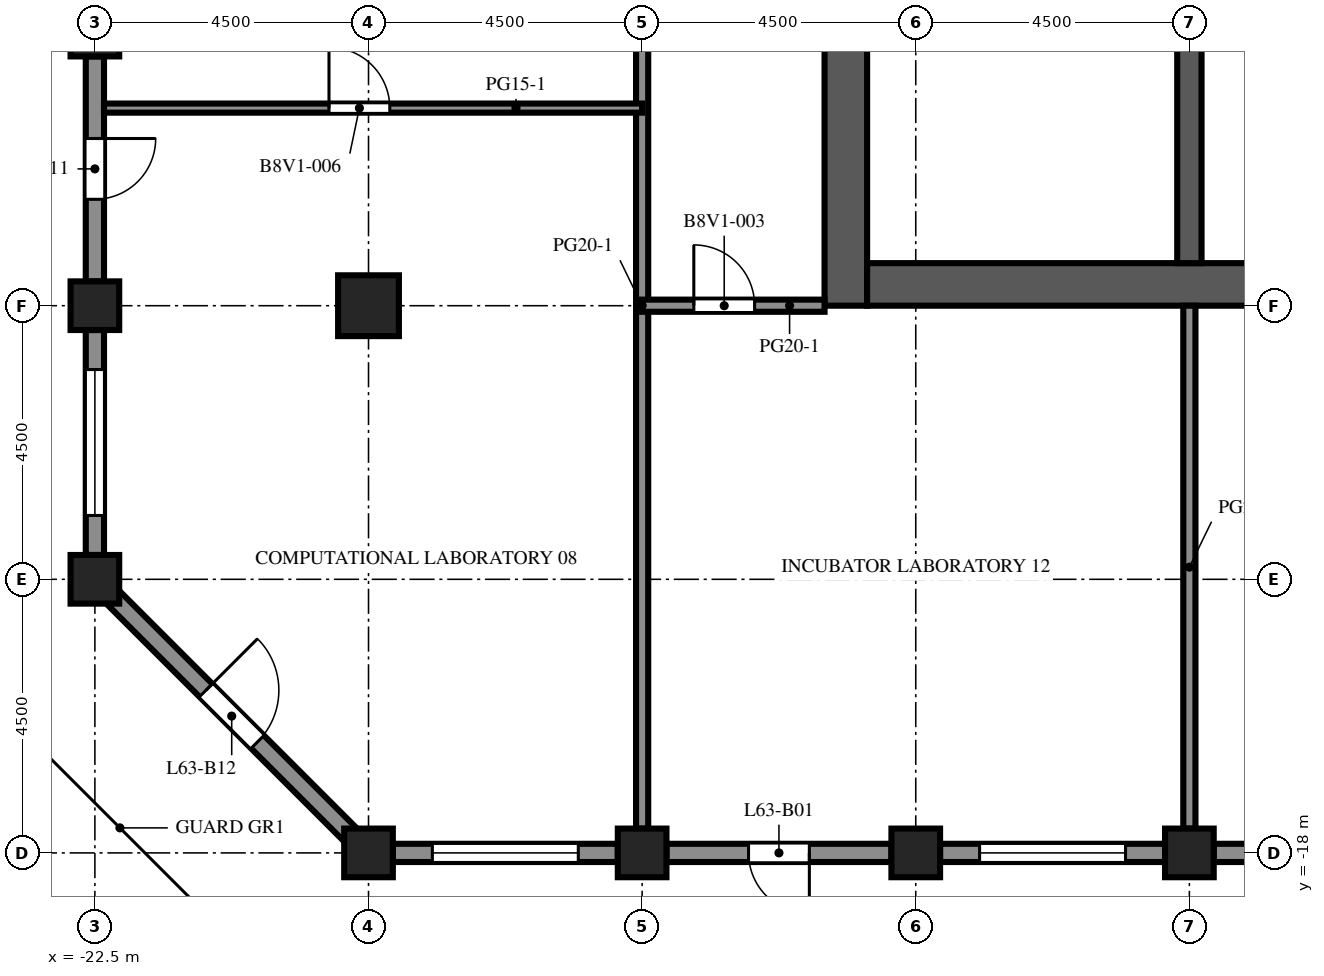
"""IFC4 building model, lengths in metres.
Left out: names, types, materials, properties, quantities, classifications, styles, units other than length and angle.
Written with IfcOpenShell. Run it as: python <this file> out.ifc"""

import sys

from ifc_helpers import new_model, si_unit, direction, frame, frame_2d, origin, origin_2d, place, context, subcontext, project, spatial, rectangle, extrude, element, fill, save


model = new_model("IFC4")
c1 = context("Model", 3, precision=1e-05, world=origin(), true_north=direction((0.0, 1.0)))
c2 = subcontext(c1, "Body", "Model", "MODEL_VIEW")
j1 = project(units=[si_unit("LENGTHUNIT", "METRE"), si_unit("PLANEANGLEUNIT", "RADIAN")], contexts=[c1])
p1 = place(None, origin())
s1 = spatial("IfcSite", under=j1, at=p1, CompositionType="ELEMENT")
p2 = place(p1, origin())
s2 = spatial("IfcBuilding", under=s1, at=p2, CompositionType="ELEMENT")
p3 = place(p2, frame((0.0, 0.0, 278.6)))
s3 = spatial("IfcBuildingStorey", under=s2, at=p3, CompositionType="ELEMENT", Elevation=278.6)
for number, where, z_axis, x_axis in (
    (1, (-22.5, -13.5, 0.0), (0.0, 0.0, 1.0), (1.0, 0.0, 0.0)),
    (2, (-22.5, -9.0, 0.0), (0.0, 0.0, 1.0), (1.0, 0.0, 0.0)),
    (3, (-22.5, -4.5, 0.0), (0.0, 0.0, 1.0), (1.0, 0.0, 0.0)),
    (4, (-18.0, -18.0, 0.0), (0.0, 0.0, 1.0), (1.0, 0.0, 0.0)),
    (5, (-13.5, -18.0, 0.0), (0.0, 0.0, 1.0), (1.0, 0.0, 0.0)),
    (6, (-9.0, -18.0, 0.0), (0.0, 0.0, 1.0), (1.0, 0.0, 0.0)),
    (7, (-4.5, -18.0, 0.0), (0.0, 0.0, 1.0), (1.0, 0.0, 0.0)),
):
    element("IfcColumn", number, at=place(p3, frame(where, z_axis=z_axis, x_axis=x_axis)), inside=s3, PredefinedType="COLUMN", context=c2, shape_type="SweptSolid", body=[
        extrude(rectangle(XDim=0.8, YDim=0.8, at=origin_2d()), origin(), (0.0, 0.0, 1.0), 4.1),
    ])
p4 = place(p3, frame((-18.0, -9.0, 0.0), z_axis=(0.0, 0.0, 1.0), x_axis=(1.0, 0.0, 0.0)))
e8 = element("IfcColumn", 8, at=p4, inside=s3, PredefinedType="COLUMN", context=c2, shape_type="SweptSolid", body=[
    extrude(rectangle(XDim=1.0, YDim=1.0, at=origin_2d()), origin(), (0.0, 0.0, 1.0), 4.1),
])
p5 = place(p3, frame((-10.15, -9.0, 0.0), z_axis=(0.0, 0.0, 1.0), x_axis=(0.0, 1.0, 0.0)))
e9 = element("IfcWall", 9, at=p5, inside=s3, PredefinedType="SHEAR", context=c2, shape_type="SweptSolid", body=[
    extrude(rectangle(XDim=27.5, YDim=0.7, at=frame_2d((13.75, 0.0))), origin(), (0.0, 0.0, 1.0), 4.1),
])
p6 = place(p5, frame((12.55, 0.0, 0.0)))
e10 = element("IfcOpeningElement", 10, at=p6, cuts=e9, PredefinedType="OPENING", context=c2, shape_type="SweptSolid", body=[
    extrude(rectangle(XDim=2.4, YDim=2.4, at=frame_2d((1.2, 1.2))), frame((0.0, 0.36, 0.0), z_axis=(0.0, -1.0, 0.0), x_axis=(1.0, 0.0, 0.0)), (0.0, 0.0, 1.0), 0.72),
])
p7 = place(p5, frame((6.825, 0.0, 0.0)))
e11 = element("IfcOpeningElement", 11, at=p7, cuts=e9, PredefinedType="OPENING", context=c2, shape_type="SweptSolid", body=[
    extrude(rectangle(XDim=1.2, YDim=2.1, at=frame_2d((0.6, 1.05))), frame((0.0, 0.36, 0.0), z_axis=(0.0, -1.0, 0.0), x_axis=(1.0, 0.0, 0.0)), (0.0, 0.0, 1.0), 0.72),
])
p8 = place(p5, frame((19.475, 0.0, 0.0)))
e12 = element("IfcOpeningElement", 12, at=p8, cuts=e9, PredefinedType="OPENING", context=c2, shape_type="SweptSolid", body=[
    extrude(rectangle(XDim=1.2, YDim=2.1, at=frame_2d((0.6, 1.05))), frame((0.0, 0.36, 0.0), z_axis=(0.0, -1.0, 0.0), x_axis=(1.0, 0.0, 0.0)), (0.0, 0.0, 1.0), 0.72),
])
p9 = place(p3, frame((-9.8, -8.65, 0.0), z_axis=(0.0, 0.0, 1.0), x_axis=(1.0, 0.0, 0.0)))
e13 = element("IfcWall", 13, at=p9, inside=s3, PredefinedType="SHEAR", context=c2, shape_type="SweptSolid", body=[
    extrude(rectangle(XDim=10.6, YDim=0.7, at=frame_2d((5.3, 0.0))), origin(), (0.0, 0.0, 1.0), 4.1),
])
p10 = place(p3, frame((-4.5, -8.3, 0.0), z_axis=(0.0, 0.0, 1.0), x_axis=(0.0, 1.0, 0.0)))
e14 = element("IfcWall", 14, at=p10, inside=s3, PredefinedType="SHEAR", context=c2, shape_type="SweptSolid", body=[
    extrude(rectangle(XDim=7.6, YDim=0.4, at=frame_2d((3.8, 0.0))), origin(), (0.0, 0.0, 1.0), 4.1),
])
p11 = place(p3, frame((-13.9, -18.0, 0.0), z_axis=(0.0, 0.0, 1.0), x_axis=(-1.0, 0.0, 0.0)))
e15 = element("IfcWall", 15, at=p11, inside=s3, PredefinedType="SOLIDWALL", context=c2, shape_type="SweptSolid", body=[
    extrude(rectangle(XDim=3.7, YDim=0.3, at=frame_2d((1.85, 0.0))), origin(), (0.0, 0.0, 1.0), 2.85),
])
p12 = place(p11, frame((0.65, 0.0, 0.8)))
e16 = element("IfcOpeningElement", 16, at=p12, cuts=e15, PredefinedType="OPENING", context=c2, shape_type="SweptSolid", body=[
    extrude(rectangle(XDim=2.4, YDim=1.7, at=frame_2d((1.2, 0.85))), frame((0.0, 0.16, 0.0), z_axis=(0.0, -1.0, 0.0), x_axis=(1.0, 0.0, 0.0)), (0.0, 0.0, 1.0), 0.32),
])
p13 = place(p3, frame((-9.4, -18.0, 0.0), z_axis=(0.0, 0.0, 1.0), x_axis=(-1.0, 0.0, 0.0)))
e17 = element("IfcWall", 17, at=p13, inside=s3, PredefinedType="SOLIDWALL", context=c2, shape_type="SweptSolid", body=[
    extrude(rectangle(XDim=3.7, YDim=0.3, at=frame_2d((1.85, 0.0))), origin(), (0.0, 0.0, 1.0), 2.85),
])
p14 = place(p13, frame((1.35, 0.0, 0.0)))
e18 = element("IfcOpeningElement", 18, at=p14, cuts=e17, PredefinedType="OPENING", context=c2, shape_type="SweptSolid", body=[
    extrude(rectangle(XDim=1.0, YDim=2.2, at=frame_2d((0.5, 1.1))), frame((0.0, 0.16, 0.0), z_axis=(0.0, -1.0, 0.0), x_axis=(1.0, 0.0, 0.0)), (0.0, 0.0, 1.0), 0.32),
])
p15 = place(p3, frame((-4.9, -18.0, 0.0), z_axis=(0.0, 0.0, 1.0), x_axis=(-1.0, 0.0, 0.0)))
e19 = element("IfcWall", 19, at=p15, inside=s3, PredefinedType="SOLIDWALL", context=c2, shape_type="SweptSolid", body=[
    extrude(rectangle(XDim=3.7, YDim=0.3, at=frame_2d((1.85, 0.0))), origin(), (0.0, 0.0, 1.0), 2.85),
])
p16 = place(p15, frame((0.65, 0.0, 0.8)))
e20 = element("IfcOpeningElement", 20, at=p16, cuts=e19, PredefinedType="OPENING", context=c2, shape_type="SweptSolid", body=[
    extrude(rectangle(XDim=2.4, YDim=1.7, at=frame_2d((1.2, 0.85))), frame((0.0, 0.16, 0.0), z_axis=(0.0, -1.0, 0.0), x_axis=(1.0, 0.0, 0.0)), (0.0, 0.0, 1.0), 0.32),
])
p17 = place(p3, frame((-0.4, -18.0, 0.0), z_axis=(0.0, 0.0, 1.0), x_axis=(-1.0, 0.0, 0.0)))
e21 = element("IfcWall", 21, at=p17, inside=s3, PredefinedType="SOLIDWALL", context=c2, shape_type="SweptSolid", body=[
    extrude(rectangle(XDim=3.7, YDim=0.3, at=frame_2d((1.85, 0.0))), origin(), (0.0, 0.0, 1.0), 2.85),
])
p18 = place(p17, frame((0.65, 0.0, 0.8)))
e22 = element("IfcOpeningElement", 22, at=p18, cuts=e21, PredefinedType="OPENING", context=c2, shape_type="SweptSolid", body=[
    extrude(rectangle(XDim=2.4, YDim=1.7, at=frame_2d((1.2, 0.85))), frame((0.0, 0.16, 0.0), z_axis=(0.0, -1.0, 0.0), x_axis=(1.0, 0.0, 0.0)), (0.0, 0.0, 1.0), 0.32),
])
p19 = place(p3, frame((-22.5, -8.6, 0.0), z_axis=(0.0, 0.0, 1.0), x_axis=(0.0, 1.0, 0.0)))
e23 = element("IfcWall", 23, at=p19, inside=s3, PredefinedType="SOLIDWALL", context=c2, shape_type="SweptSolid", body=[
    extrude(rectangle(XDim=3.7, YDim=0.3, at=frame_2d((1.85, 0.0))), origin(), (0.0, 0.0, 1.0), 2.85),
])
p20 = place(p19, frame((1.35, 0.0, 0.0)))
e24 = element("IfcOpeningElement", 24, at=p20, cuts=e23, PredefinedType="OPENING", context=c2, shape_type="SweptSolid", body=[
    extrude(rectangle(XDim=1.0, YDim=2.2, at=frame_2d((0.5, 1.1))), frame((0.0, 0.16, 0.0), z_axis=(0.0, -1.0, 0.0), x_axis=(1.0, 0.0, 0.0)), (0.0, 0.0, 1.0), 0.32),
])
p21 = place(p3, frame((-22.5, -13.1, 0.0), z_axis=(0.0, 0.0, 1.0), x_axis=(0.0, 1.0, 0.0)))
e25 = element("IfcWall", 25, at=p21, inside=s3, PredefinedType="SOLIDWALL", context=c2, shape_type="SweptSolid", body=[
    extrude(rectangle(XDim=3.7, YDim=0.3, at=frame_2d((1.85, 0.0))), origin(), (0.0, 0.0, 1.0), 2.85),
])
p22 = place(p21, frame((0.65, 0.0, 0.8)))
e26 = element("IfcOpeningElement", 26, at=p22, cuts=e25, PredefinedType="OPENING", context=c2, shape_type="SweptSolid", body=[
    extrude(rectangle(XDim=2.4, YDim=1.7, at=frame_2d((1.2, 0.85))), frame((0.0, 0.16, 0.0), z_axis=(0.0, -1.0, 0.0), x_axis=(1.0, 0.0, 0.0)), (0.0, 0.0, 1.0), 0.32),
])
p23 = place(p3, frame((-18.294, -17.706, 0.0), z_axis=(0.0, 0.0, 1.0), x_axis=(-0.707106781187, 0.707106781187, 0.0)))
e27 = element("IfcWall", 27, at=p23, inside=s3, PredefinedType="SOLIDWALL", context=c2, shape_type="SweptSolid", body=[
    extrude(rectangle(XDim=5.532, YDim=0.3, at=frame_2d((2.766, 0.0))), origin(), (0.0, 0.0, 1.0), 2.85),
])
p24 = place(p23, frame((2.166, 0.0, 0.0)))
e28 = element("IfcOpeningElement", 28, at=p24, cuts=e27, PredefinedType="OPENING", context=c2, shape_type="SweptSolid", body=[
    extrude(rectangle(XDim=1.2, YDim=2.2, at=frame_2d((0.6, 1.1))), frame((0.0, 0.16, 0.0), z_axis=(0.0, -1.0, 0.0), x_axis=(1.0, 0.0, 0.0)), (0.0, 0.0, 1.0), 0.32),
])
p25 = place(p3, frame((-4.3, -6.02, 0.0), z_axis=(0.0, 0.0, 1.0), x_axis=(1.0, 0.0, 0.0)))
e29 = element("IfcWall", 29, at=p25, inside=s3, PredefinedType="PARTITIONING", context=c2, shape_type="SweptSolid", body=[
    extrude(rectangle(XDim=3.5, YDim=0.1, at=frame_2d((1.75, 0.0))), origin(), (0.0, 0.0, 1.0), 3.65),
])
p26 = place(p3, frame((-13.5, -17.6, 0.0), z_axis=(0.0, 0.0, 1.0), x_axis=(0.0, 1.0, 0.0)))
e30 = element("IfcWall", 30, at=p26, inside=s3, PredefinedType="PARTITIONING", context=c2, shape_type="SweptSolid", body=[
    extrude(rectangle(XDim=20.85, YDim=0.2, at=frame_2d((10.425, 0.0))), origin(), (0.0, 0.0, 1.0), 3.65),
])
p27 = place(p26, frame((17.2, 0.0, 0.0)))
e31 = element("IfcOpeningElement", 31, at=p27, cuts=e30, PredefinedType="OPENING", context=c2, shape_type="SweptSolid", body=[
    extrude(rectangle(XDim=1.0, YDim=2.1, at=frame_2d((0.5, 1.05))), frame((0.0, 0.11, 0.0), z_axis=(0.0, -1.0, 0.0), x_axis=(1.0, 0.0, 0.0)), (0.0, 0.0, 1.0), 0.22),
])
p28 = place(p3, frame((-4.5, -17.6, 0.0), z_axis=(0.0, 0.0, 1.0), x_axis=(0.0, 1.0, 0.0)))
e32 = element("IfcWall", 32, at=p28, inside=s3, PredefinedType="PARTITIONING", context=c2, shape_type="SweptSolid", body=[
    extrude(rectangle(XDim=8.6, YDim=0.2, at=frame_2d((4.3, 0.0))), origin(), (0.0, 0.0, 1.0), 3.65),
])
p29 = place(p3, frame((-10.5, -9.0, 0.0), z_axis=(0.0, 0.0, 1.0), x_axis=(-1.0, 0.0, 0.0)))
e33 = element("IfcWall", 33, at=p29, inside=s3, PredefinedType="PARTITIONING", context=c2, shape_type="SweptSolid", body=[
    extrude(rectangle(XDim=3.0, YDim=0.2, at=frame_2d((1.5, 0.0))), origin(), (0.0, 0.0, 1.0), 3.65),
])
p30 = place(p29, frame((1.15, 0.0, 0.0)))
e34 = element("IfcOpeningElement", 34, at=p30, cuts=e33, PredefinedType="OPENING", context=c2, shape_type="SweptSolid", body=[
    extrude(rectangle(XDim=1.0, YDim=2.1, at=frame_2d((0.5, 1.05))), frame((0.0, 0.11, 0.0), z_axis=(0.0, -1.0, 0.0), x_axis=(1.0, 0.0, 0.0)), (0.0, 0.0, 1.0), 0.22),
])
p31 = place(p3, frame((-13.5, -5.75, 0.0), z_axis=(0.0, 0.0, 1.0), x_axis=(-1.0, 0.0, 0.0)))
e35 = element("IfcWall", 35, at=p31, inside=s3, PredefinedType="PARTITIONING", context=c2, shape_type="SweptSolid", body=[
    extrude(rectangle(XDim=8.85, YDim=0.15, at=frame_2d((4.425, 0.0))), origin(), (0.0, 0.0, 1.0), 3.65),
])
p32 = place(p31, frame((4.15, 0.0, 0.0)))
e36 = element("IfcOpeningElement", 36, at=p32, cuts=e35, PredefinedType="OPENING", context=c2, shape_type="SweptSolid", body=[
    extrude(rectangle(XDim=1.0, YDim=2.1, at=frame_2d((0.5, 1.05))), frame((0.0, 0.085, 0.0), z_axis=(0.0, -1.0, 0.0), x_axis=(1.0, 0.0, 0.0)), (0.0, 0.0, 1.0), 0.17),
])
p33 = place(p12, origin())
e37 = element("IfcWindow", 37, at=p33, inside=s3, PartitioningType="SINGLE_PANEL", PredefinedType="WINDOW", context=c2, shape_type="SweptSolid", body=[
    extrude(rectangle(XDim=2.4, YDim=1.7, at=frame_2d((1.2, 0.85))), frame((0.0, 0.03, 0.0), z_axis=(0.0, -1.0, 0.0), x_axis=(1.0, 0.0, 0.0)), (0.0, 0.0, 1.0), 0.06),
])
fill(e16, e37)
p34 = place(p14, origin())
e38 = element("IfcDoor", 38, at=p34, inside=s3, OperationType="SINGLE_SWING_LEFT", PredefinedType="DOOR", context=c2, shape_type="SweptSolid", body=[
    extrude(rectangle(XDim=1.0, YDim=2.2, at=frame_2d((0.5, 1.1))), frame((0.0, 0.025, 0.0), z_axis=(0.0, -1.0, 0.0), x_axis=(1.0, 0.0, 0.0)), (0.0, 0.0, 1.0), 0.05),
])
fill(e18, e38)
p35 = place(p16, origin())
e39 = element("IfcWindow", 39, at=p35, inside=s3, PartitioningType="SINGLE_PANEL", PredefinedType="WINDOW", context=c2, shape_type="SweptSolid", body=[
    extrude(rectangle(XDim=2.4, YDim=1.7, at=frame_2d((1.2, 0.85))), frame((0.0, 0.03, 0.0), z_axis=(0.0, -1.0, 0.0), x_axis=(1.0, 0.0, 0.0)), (0.0, 0.0, 1.0), 0.06),
])
fill(e20, e39)
p36 = place(p20, origin())
e40 = element("IfcDoor", 40, at=p36, inside=s3, OperationType="SINGLE_SWING_RIGHT", PredefinedType="DOOR", context=c2, shape_type="SweptSolid", body=[
    extrude(rectangle(XDim=1.0, YDim=2.2, at=frame_2d((0.5, 1.1))), frame((0.0, 0.025, 0.0), z_axis=(0.0, -1.0, 0.0), x_axis=(1.0, 0.0, 0.0)), (0.0, 0.0, 1.0), 0.05),
])
fill(e24, e40)
p37 = place(p22, origin())
e41 = element("IfcWindow", 41, at=p37, inside=s3, PartitioningType="SINGLE_PANEL", PredefinedType="WINDOW", context=c2, shape_type="SweptSolid", body=[
    extrude(rectangle(XDim=2.4, YDim=1.7, at=frame_2d((1.2, 0.85))), frame((0.0, 0.03, 0.0), z_axis=(0.0, -1.0, 0.0), x_axis=(1.0, 0.0, 0.0)), (0.0, 0.0, 1.0), 0.06),
])
fill(e26, e41)
p38 = place(p24, origin())
e42 = element("IfcDoor", 42, at=p38, inside=s3, OperationType="SINGLE_SWING_RIGHT", PredefinedType="DOOR", context=c2, shape_type="SweptSolid", body=[
    extrude(rectangle(XDim=1.2, YDim=2.2, at=frame_2d((0.6, 1.1))), frame((0.0, 0.025, 0.0), z_axis=(0.0, -1.0, 0.0), x_axis=(1.0, 0.0, 0.0)), (0.0, 0.0, 1.0), 0.05),
])
fill(e28, e42)
p39 = place(p30, origin())
e43 = element("IfcDoor", 43, at=p39, inside=s3, OperationType="SINGLE_SWING_RIGHT", PredefinedType="DOOR", context=c2, shape_type="SweptSolid", body=[
    extrude(rectangle(XDim=1.0, YDim=2.1, at=frame_2d((0.5, 1.05))), frame((0.0, 0.025, 0.0), z_axis=(0.0, -1.0, 0.0), x_axis=(1.0, 0.0, 0.0)), (0.0, 0.0, 1.0), 0.05),
])
fill(e34, e43)
p40 = place(p32, origin())
e44 = element("IfcDoor", 44, at=p40, inside=s3, OperationType="SINGLE_SWING_RIGHT", PredefinedType="DOOR", context=c2, shape_type="SweptSolid", body=[
    extrude(rectangle(XDim=1.0, YDim=2.1, at=frame_2d((0.5, 1.05))), frame((0.0, 0.025, 0.0), z_axis=(0.0, -1.0, 0.0), x_axis=(1.0, 0.0, 0.0)), (0.0, 0.0, 1.0), 0.05),
])
fill(e36, e44)
save(model, sys.argv[1])
